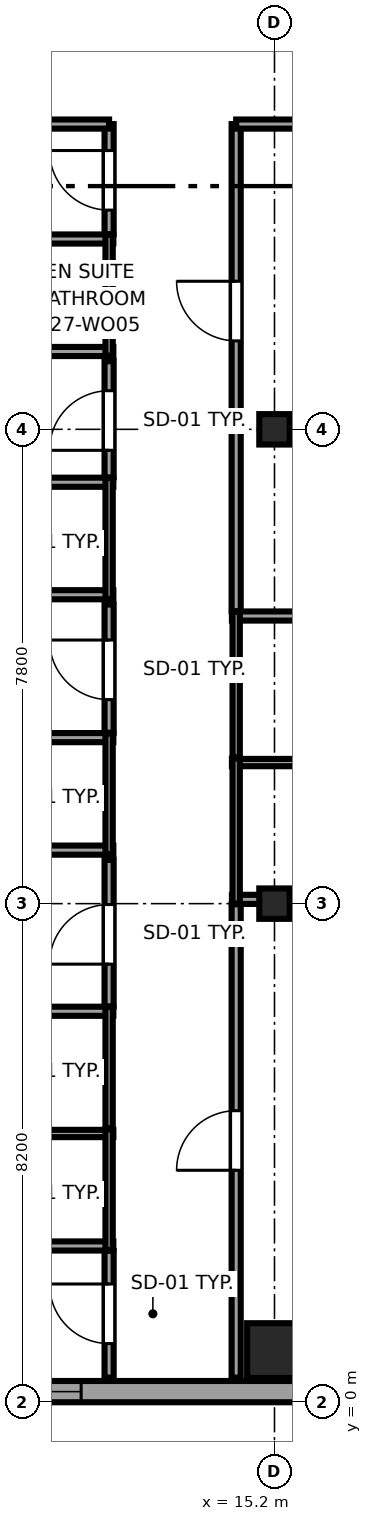
"""IFC4 building model, lengths in metres.
Left out: names, types, materials, properties, quantities, classifications, styles, units other than length and angle.
Written with IfcOpenShell. Run it as: python <this file> out.ifc"""

import sys

from ifc_helpers import new_model, si_unit, direction, frame, frame_2d, origin, origin_2d, place, context, subcontext, project, spatial, rectangle, i_section, extrude, source, transform, mapped, element, fill, save


model = new_model("IFC4")
c1 = context("Model", 3, precision=1e-05, world=origin(), true_north=direction((0.0, 1.0)))
c2 = subcontext(c1, "Body", "Model", "MODEL_VIEW")
j1 = project(units=[si_unit("LENGTHUNIT", "METRE"), si_unit("PLANEANGLEUNIT", "RADIAN")], contexts=[c1])
p1 = place(None, origin())
s1 = spatial("IfcSite", under=j1, at=p1, CompositionType="ELEMENT")
p2 = place(p1, origin())
s2 = spatial("IfcBuilding", under=s1, at=p2, CompositionType="ELEMENT")
p3 = place(p2, frame((0.0, 0.0, 108.0)))
s3 = spatial("IfcBuildingStorey", under=s2, at=p3, CompositionType="ELEMENT", Elevation=108.0)
m1 = source(origin(), c2, "Body", "SweptSolid", [
    extrude(rectangle(XDim=0.9, YDim=0.9, at=origin_2d()), origin(), (0.0, 0.0, 1.0), 3.55),
])
p4 = place(p3, frame((15.2, 0.85, 0.0), z_axis=(0.0, 0.0, 1.0), x_axis=(1.0, 0.0, 0.0)))
e1 = element("IfcColumn", 1, at=p4, inside=s3, PredefinedType="COLUMN", context=c2, shape_type="MappedRepresentation", body=[
    mapped(m1, transform((0.0, 0.0, 0.0), x_axis=(1.0, 0.0, 0.0), y_axis=(0.0, 1.0, 0.0), z_axis=(0.0, 0.0, 1.0), scale=1.0)),
])
m2 = source(origin(), c2, "Body", "SweptSolid", [
    extrude(i_section(OverallWidth=0.5, OverallDepth=0.5, WebThickness=0.022, FlangeThickness=0.034, at=origin_2d()), origin(), (0.0, 0.0, 1.0), 3.55),
])
for number, where, z_axis, x_axis in (
    (2, (15.2, 8.2, 0.0), (0.0, 0.0, 1.0), (1.0, 0.0, 0.0)),
    (3, (15.2, 16.0, 0.0), (0.0, 0.0, 1.0), (1.0, 0.0, 0.0)),
):
    element("IfcColumn", number, at=place(p3, frame(where, z_axis=z_axis, x_axis=x_axis)), inside=s3, PredefinedType="COLUMN", context=c2, shape_type="MappedRepresentation", body=[
        mapped(m2, transform((0.0, 0.0, 0.0), x_axis=(1.0, 0.0, 0.0), y_axis=(0.0, 1.0, 0.0), z_axis=(0.0, 0.0, 1.0), scale=1.0)),
    ])
p5 = place(p3, frame((4.617, 0.175, 0.0), z_axis=(0.0, 0.0, 1.0), x_axis=(1.0, 0.0, 0.0)))
e4 = element("IfcWall", 4, at=p5, inside=s3, PredefinedType="SOLIDWALL", context=c2, shape_type="SweptSolid", body=[
    extrude(rectangle(XDim=18.008, YDim=0.35, at=frame_2d((9.004, 0.0))), origin(), (0.0, 0.0, 1.0), 3.37),
])
p6 = place(p5, frame((5.303, 0.0, 0.68)))
e5 = element("IfcOpeningElement", 5, at=p6, cuts=e4, PredefinedType="OPENING", context=c2, shape_type="SweptSolid", body=[
    extrude(rectangle(XDim=2.1, YDim=1.9, at=frame_2d((1.05, 0.95))), frame((0.0, 0.185, 0.0), z_axis=(0.0, -1.0, 0.0), x_axis=(1.0, 0.0, 0.0)), (0.0, 0.0, 1.0), 0.37),
])
p7 = place(p5, frame((14.257, 0.0, 0.68)))
e6 = element("IfcOpeningElement", 6, at=p7, cuts=e4, PredefinedType="OPENING", context=c2, shape_type="SweptSolid", body=[
    extrude(rectangle(XDim=2.1, YDim=1.9, at=frame_2d((1.05, 0.95))), frame((0.0, 0.185, 0.0), z_axis=(0.0, -1.0, 0.0), x_axis=(1.0, 0.0, 0.0)), (0.0, 0.0, 1.0), 0.37),
])
p8 = place(p3, frame((9.96, 2.57, 0.0), z_axis=(0.0, 0.0, 1.0), x_axis=(1.0, 0.0, 0.0)))
e7 = element("IfcWall", 7, at=p8, inside=s3, PredefinedType="PARTITIONING", context=c2, shape_type="SweptSolid", body=[
    extrude(rectangle(XDim=2.59, YDim=0.15, at=frame_2d((1.295, 0.0))), origin(), (0.0, 0.0, 1.0), 3.37),
])
p9 = place(p3, frame((9.96, 4.42, 0.0), z_axis=(0.0, 0.0, 1.0), x_axis=(1.0, 0.0, 0.0)))
e8 = element("IfcWall", 8, at=p9, inside=s3, PredefinedType="PLUMBINGWALL", context=c2, shape_type="SweptSolid", body=[
    extrude(rectangle(XDim=2.59, YDim=0.12, at=frame_2d((1.295, 0.0))), origin(), (0.0, 0.0, 1.0), 3.37),
])
p10 = place(p3, frame((12.48, 2.5, 0.0), z_axis=(0.0, 0.0, 1.0), x_axis=(0.0, 1.0, 0.0)))
e9 = element("IfcWall", 9, at=p10, inside=s3, PredefinedType="PLUMBINGWALL", context=c2, shape_type="SweptSolid", body=[
    extrude(rectangle(XDim=1.99, YDim=0.12, at=frame_2d((0.995, 0.0))), origin(), (0.0, 0.0, 1.0), 3.37),
])
p11 = place(p3, frame((9.96, 6.43, 0.0), z_axis=(0.0, 0.0, 1.0), x_axis=(1.0, 0.0, 0.0)))
e10 = element("IfcWall", 10, at=p11, inside=s3, PredefinedType="PARTITIONING", context=c2, shape_type="SweptSolid", body=[
    extrude(rectangle(XDim=2.59, YDim=0.15, at=frame_2d((1.295, 0.0))), origin(), (0.0, 0.0, 1.0), 3.37),
])
p12 = place(p3, frame((12.48, 4.51, 0.0), z_axis=(0.0, 0.0, 1.0), x_axis=(0.0, 1.0, 0.0)))
e11 = element("IfcWall", 11, at=p12, inside=s3, PredefinedType="PLUMBINGWALL", context=c2, shape_type="SweptSolid", body=[
    extrude(rectangle(XDim=1.99, YDim=0.12, at=frame_2d((0.995, 0.0))), origin(), (0.0, 0.0, 1.0), 3.37),
])
p13 = place(p3, frame((0.405, 9.08, 0.0), z_axis=(0.0, 0.0, 1.0), x_axis=(1.0, 0.0, 0.0)))
e12 = element("IfcWall", 12, at=p13, inside=s3, PredefinedType="PARTITIONING", context=c2, shape_type="SweptSolid", body=[
    extrude(rectangle(XDim=12.145, YDim=0.15, at=frame_2d((6.073, 0.0))), origin(), (0.0, 0.0, 1.0), 3.37),
])
p14 = place(p3, frame((9.96, 10.93, 0.0), z_axis=(0.0, 0.0, 1.0), x_axis=(1.0, 0.0, 0.0)))
e13 = element("IfcWall", 13, at=p14, inside=s3, PredefinedType="PARTITIONING", context=c2, shape_type="SweptSolid", body=[
    extrude(rectangle(XDim=2.59, YDim=0.15, at=frame_2d((1.295, 0.0))), origin(), (0.0, 0.0, 1.0), 3.37),
])
p15 = place(p3, frame((12.48, 9.01, 0.0), z_axis=(0.0, 0.0, 1.0), x_axis=(0.0, 1.0, 0.0)))
e14 = element("IfcWall", 14, at=p15, inside=s3, PredefinedType="PLUMBINGWALL", context=c2, shape_type="SweptSolid", body=[
    extrude(rectangle(XDim=1.99, YDim=0.12, at=frame_2d((0.995, 0.0))), origin(), (0.0, 0.0, 1.0), 3.37),
])
p16 = place(p3, frame((0.405, 13.28, 0.0), z_axis=(0.0, 0.0, 1.0), x_axis=(1.0, 0.0, 0.0)))
e15 = element("IfcWall", 15, at=p16, inside=s3, PredefinedType="PARTITIONING", context=c2, shape_type="SweptSolid", body=[
    extrude(rectangle(XDim=12.145, YDim=0.15, at=frame_2d((6.073, 0.0))), origin(), (0.0, 0.0, 1.0), 3.37),
])
p17 = place(p3, frame((9.96, 15.13, 0.0), z_axis=(0.0, 0.0, 1.0), x_axis=(1.0, 0.0, 0.0)))
e16 = element("IfcWall", 16, at=p17, inside=s3, PredefinedType="PARTITIONING", context=c2, shape_type="SweptSolid", body=[
    extrude(rectangle(XDim=2.59, YDim=0.15, at=frame_2d((1.295, 0.0))), origin(), (0.0, 0.0, 1.0), 3.37),
])
p18 = place(p3, frame((12.48, 13.21, 0.0), z_axis=(0.0, 0.0, 1.0), x_axis=(0.0, 1.0, 0.0)))
e17 = element("IfcWall", 17, at=p18, inside=s3, PredefinedType="PLUMBINGWALL", context=c2, shape_type="SweptSolid", body=[
    extrude(rectangle(XDim=1.99, YDim=0.12, at=frame_2d((0.995, 0.0))), origin(), (0.0, 0.0, 1.0), 3.37),
])
p19 = place(p3, frame((0.405, 17.28, 0.0), z_axis=(0.0, 0.0, 1.0), x_axis=(1.0, 0.0, 0.0)))
e18 = element("IfcWall", 18, at=p19, inside=s3, PredefinedType="PARTITIONING", context=c2, shape_type="SweptSolid", body=[
    extrude(rectangle(XDim=12.145, YDim=0.15, at=frame_2d((6.073, 0.0))), origin(), (0.0, 0.0, 1.0), 3.37),
])
p20 = place(p3, frame((9.96, 19.13, 0.0), z_axis=(0.0, 0.0, 1.0), x_axis=(1.0, 0.0, 0.0)))
e19 = element("IfcWall", 19, at=p20, inside=s3, PredefinedType="PARTITIONING", context=c2, shape_type="SweptSolid", body=[
    extrude(rectangle(XDim=2.59, YDim=0.15, at=frame_2d((1.295, 0.0))), origin(), (0.0, 0.0, 1.0), 3.37),
])
p21 = place(p3, frame((12.48, 17.21, 0.0), z_axis=(0.0, 0.0, 1.0), x_axis=(0.0, 1.0, 0.0)))
e20 = element("IfcWall", 20, at=p21, inside=s3, PredefinedType="PLUMBINGWALL", context=c2, shape_type="SweptSolid", body=[
    extrude(rectangle(XDim=1.99, YDim=0.12, at=frame_2d((0.995, 0.0))), origin(), (0.0, 0.0, 1.0), 3.37),
])
p22 = place(p3, frame((14.5, 8.27, 0.0), z_axis=(0.0, 0.0, 1.0), x_axis=(1.0, 0.0, 0.0)))
e21 = element("IfcWall", 21, at=p22, inside=s3, PredefinedType="PARTITIONING", context=c2, shape_type="SweptSolid", body=[
    extrude(rectangle(XDim=2.59, YDim=0.15, at=frame_2d((1.295, 0.0))), origin(), (0.0, 0.0, 1.0), 2.748),
])
p23 = place(p3, frame((14.5, 10.52, 0.0), z_axis=(0.0, 0.0, 1.0), x_axis=(1.0, 0.0, 0.0)))
e22 = element("IfcWall", 22, at=p23, inside=s3, PredefinedType="PLUMBINGWALL", context=c2, shape_type="SweptSolid", body=[
    extrude(rectangle(XDim=2.59, YDim=0.12, at=frame_2d((1.295, 0.0))), origin(), (0.0, 0.0, 1.0), 3.37),
])
p24 = place(p3, frame((14.57, 8.2, 0.0), z_axis=(0.0, 0.0, 1.0), x_axis=(0.0, 1.0, 0.0)))
e23 = element("IfcWall", 23, at=p24, inside=s3, PredefinedType="PLUMBINGWALL", context=c2, shape_type="SweptSolid", body=[
    extrude(rectangle(XDim=2.39, YDim=0.12, at=frame_2d((1.195, 0.0))), origin(), (0.0, 0.0, 1.0), 3.37),
])
p25 = place(p3, frame((14.5, 12.93, 0.0), z_axis=(0.0, 0.0, 1.0), x_axis=(1.0, 0.0, 0.0)))
e24 = element("IfcWall", 24, at=p25, inside=s3, PredefinedType="PARTITIONING", context=c2, shape_type="SweptSolid", body=[
    extrude(rectangle(XDim=2.59, YDim=0.15, at=frame_2d((1.295, 0.0))), origin(), (0.0, 0.0, 1.0), 3.37),
])
p26 = place(p3, frame((14.57, 10.61, 0.0), z_axis=(0.0, 0.0, 1.0), x_axis=(0.0, 1.0, 0.0)))
e25 = element("IfcWall", 25, at=p26, inside=s3, PredefinedType="PLUMBINGWALL", context=c2, shape_type="SweptSolid", body=[
    extrude(rectangle(XDim=2.39, YDim=0.12, at=frame_2d((1.195, 0.0))), origin(), (0.0, 0.0, 1.0), 3.37),
])
p27 = place(p3, frame((12.48, 0.405, 0.0), z_axis=(0.0, 0.0, 1.0), x_axis=(0.0, 1.0, 0.0)))
e26 = element("IfcWall", 26, at=p27, inside=s3, PredefinedType="PARTITIONING", context=c2, shape_type="SweptSolid", body=[
    extrude(rectangle(XDim=2.085, YDim=0.15, at=frame_2d((1.042, 0.0))), origin(), (0.0, 0.0, 1.0), 3.37),
])
p28 = place(p27, frame((0.56, 0.0, 0.0)))
e27 = element("IfcOpeningElement", 27, at=p28, cuts=e26, PredefinedType="OPENING", context=c2, shape_type="SweptSolid", body=[
    extrude(rectangle(XDim=0.98, YDim=2.12, at=frame_2d((0.49, 1.06))), frame((0.0, 0.085, 0.0), z_axis=(0.0, -1.0, 0.0), x_axis=(1.0, 0.0, 0.0)), (0.0, 0.0, 1.0), 0.17),
])
p29 = place(p3, frame((12.48, 6.51, 0.0), z_axis=(0.0, 0.0, 1.0), x_axis=(0.0, 1.0, 0.0)))
e28 = element("IfcWall", 28, at=p29, inside=s3, PredefinedType="PARTITIONING", context=c2, shape_type="SweptSolid", body=[
    extrude(rectangle(XDim=2.41, YDim=0.15, at=frame_2d((1.205, 0.0))), origin(), (0.0, 0.0, 1.0), 3.37),
])
p30 = place(p29, frame((0.695, 0.0, 0.0)))
e29 = element("IfcOpeningElement", 29, at=p30, cuts=e28, PredefinedType="OPENING", context=c2, shape_type="SweptSolid", body=[
    extrude(rectangle(XDim=0.98, YDim=2.12, at=frame_2d((0.49, 1.06))), frame((0.0, 0.085, 0.0), z_axis=(0.0, -1.0, 0.0), x_axis=(1.0, 0.0, 0.0)), (0.0, 0.0, 1.0), 0.17),
])
p31 = place(p3, frame((12.48, 11.01, 0.0), z_axis=(0.0, 0.0, 1.0), x_axis=(0.0, 1.0, 0.0)))
e30 = element("IfcWall", 30, at=p31, inside=s3, PredefinedType="PARTITIONING", context=c2, shape_type="SweptSolid", body=[
    extrude(rectangle(XDim=2.11, YDim=0.15, at=frame_2d((1.055, 0.0))), origin(), (0.0, 0.0, 1.0), 3.37),
])
p32 = place(p31, frame((0.545, 0.0, 0.0)))
e31 = element("IfcOpeningElement", 31, at=p32, cuts=e30, PredefinedType="OPENING", context=c2, shape_type="SweptSolid", body=[
    extrude(rectangle(XDim=0.98, YDim=2.12, at=frame_2d((0.49, 1.06))), frame((0.0, 0.085, 0.0), z_axis=(0.0, -1.0, 0.0), x_axis=(1.0, 0.0, 0.0)), (0.0, 0.0, 1.0), 0.17),
])
p33 = place(p3, frame((12.48, 15.21, 0.0), z_axis=(0.0, 0.0, 1.0), x_axis=(0.0, 1.0, 0.0)))
e32 = element("IfcWall", 32, at=p33, inside=s3, PredefinedType="PARTITIONING", context=c2, shape_type="SweptSolid", body=[
    extrude(rectangle(XDim=1.91, YDim=0.15, at=frame_2d((0.955, 0.0))), origin(), (0.0, 0.0, 1.0), 3.37),
])
p34 = place(p33, frame((0.445, 0.0, 0.0)))
e33 = element("IfcOpeningElement", 33, at=p34, cuts=e32, PredefinedType="OPENING", context=c2, shape_type="SweptSolid", body=[
    extrude(rectangle(XDim=0.98, YDim=2.12, at=frame_2d((0.49, 1.06))), frame((0.0, 0.085, 0.0), z_axis=(0.0, -1.0, 0.0), x_axis=(1.0, 0.0, 0.0)), (0.0, 0.0, 1.0), 0.17),
])
p35 = place(p3, frame((12.48, 19.21, 0.0), z_axis=(0.0, 0.0, 1.0), x_axis=(0.0, 1.0, 0.0)))
e34 = element("IfcWall", 34, at=p35, inside=s3, PredefinedType="PARTITIONING", context=c2, shape_type="SweptSolid", body=[
    extrude(rectangle(XDim=1.81, YDim=0.15, at=frame_2d((0.905, 0.0))), origin(), (0.0, 0.0, 1.0), 3.37),
])
p36 = place(p35, frame((0.395, 0.0, 0.0)))
e35 = element("IfcOpeningElement", 35, at=p36, cuts=e34, PredefinedType="OPENING", context=c2, shape_type="SweptSolid", body=[
    extrude(rectangle(XDim=0.98, YDim=2.12, at=frame_2d((0.49, 1.06))), frame((0.0, 0.085, 0.0), z_axis=(0.0, -1.0, 0.0), x_axis=(1.0, 0.0, 0.0)), (0.0, 0.0, 1.0), 0.17),
])
p37 = place(p3, frame((0.405, 21.02, 0.0), z_axis=(0.0, 0.0, 1.0), x_axis=(1.0, 0.0, 0.0)))
e36 = element("IfcWall", 36, at=p37, inside=s3, PredefinedType="PARTITIONING", context=c2, shape_type="SweptSolid", body=[
    extrude(rectangle(XDim=12.075, YDim=0.15, at=frame_2d((6.038, 0.0))), origin(), (0.0, 0.0, 1.0), 3.37),
])
p38 = place(p3, frame((14.57, 0.405, 0.0), z_axis=(0.0, 0.0, 1.0), x_axis=(0.0, 1.0, 0.0)))
e37 = element("IfcWall", 37, at=p38, inside=s3, PredefinedType="PARTITIONING", context=c2, shape_type="SweptSolid", body=[
    extrude(rectangle(XDim=7.785, YDim=0.15, at=frame_2d((3.893, 0.0))), origin(), (0.0, 0.0, 1.0), 3.37),
])
p39 = place(p38, frame((3.41, 0.0, 0.0)))
e38 = element("IfcOpeningElement", 38, at=p39, cuts=e37, PredefinedType="OPENING", context=c2, shape_type="SweptSolid", body=[
    extrude(rectangle(XDim=0.98, YDim=2.12, at=frame_2d((0.49, 1.06))), frame((0.0, 0.085, 0.0), z_axis=(0.0, -1.0, 0.0), x_axis=(1.0, 0.0, 0.0)), (0.0, 0.0, 1.0), 0.17),
])
p40 = place(p3, frame((14.57, 13.01, 0.0), z_axis=(0.0, 0.0, 1.0), x_axis=(0.0, 1.0, 0.0)))
e39 = element("IfcWall", 39, at=p40, inside=s3, PredefinedType="PARTITIONING", context=c2, shape_type="SweptSolid", body=[
    extrude(rectangle(XDim=8.01, YDim=0.15, at=frame_2d((4.005, 0.0))), origin(), (0.0, 0.0, 1.0), 3.37),
])
p41 = place(p40, frame((4.445, 0.0, 0.0)))
e40 = element("IfcOpeningElement", 40, at=p41, cuts=e39, PredefinedType="OPENING", context=c2, shape_type="SweptSolid", body=[
    extrude(rectangle(XDim=0.98, YDim=2.12, at=frame_2d((0.49, 1.06))), frame((0.0, 0.085, 0.0), z_axis=(0.0, -1.0, 0.0), x_axis=(1.0, 0.0, 0.0)), (0.0, 0.0, 1.0), 0.17),
])
p42 = place(p3, frame((14.57, 21.02, 0.0), z_axis=(0.0, 0.0, 1.0), x_axis=(1.0, 0.0, 0.0)))
e41 = element("IfcWall", 41, at=p42, inside=s3, PredefinedType="PARTITIONING", context=c2, shape_type="SweptSolid", body=[
    extrude(rectangle(XDim=7.78, YDim=0.15, at=frame_2d((3.89, 0.0))), origin(), (0.0, 0.0, 1.0), 3.37),
])
m3 = source(origin(), c2, "Body", "SweptSolid", [
    extrude(rectangle(XDim=2.1, YDim=1.9, at=frame_2d((1.05, 0.95))), frame((0.0, 0.09, 0.0), z_axis=(0.0, -1.0, 0.0), x_axis=(1.0, 0.0, 0.0)), (0.0, 0.0, 1.0), 0.06),
])
p43 = place(p6, origin())
e42 = element("IfcWindow", 42, at=p43, inside=s3, PartitioningType="TRIPLE_PANEL_HORIZONTAL", PredefinedType="WINDOW", context=c2, shape_type="MappedRepresentation", body=[
    mapped(m3, transform((0.0, 0.0, 0.0), x_axis=(1.0, 0.0, 0.0), y_axis=(0.0, 1.0, 0.0), z_axis=(0.0, 0.0, 1.0), scale=1.0)),
])
fill(e5, e42)
m4 = source(origin(), c2, "Body", "SweptSolid", [
    extrude(rectangle(XDim=0.98, YDim=2.12, at=frame_2d((0.49, 1.06))), frame((0.0, 0.025, 0.0), z_axis=(0.0, -1.0, 0.0), x_axis=(1.0, 0.0, 0.0)), (0.0, 0.0, 1.0), 0.05),
])
p44 = place(p28, origin())
e43 = element("IfcDoor", 43, at=p44, inside=s3, OperationType="SINGLE_SWING_RIGHT", PredefinedType="DOOR", context=c2, shape_type="MappedRepresentation", body=[
    mapped(m4, transform((0.0, 0.0, 0.0), x_axis=(1.0, 0.0, 0.0), y_axis=(0.0, 1.0, 0.0), z_axis=(0.0, 0.0, 1.0), scale=1.0)),
])
fill(e27, e43)
p45 = place(p30, origin())
e44 = element("IfcDoor", 44, at=p45, inside=s3, OperationType="SINGLE_SWING_LEFT", PredefinedType="DOOR", context=c2, shape_type="MappedRepresentation", body=[
    mapped(m4, transform((0.0, 0.0, 0.0), x_axis=(1.0, 0.0, 0.0), y_axis=(0.0, 1.0, 0.0), z_axis=(0.0, 0.0, 1.0), scale=1.0)),
])
fill(e29, e44)
p46 = place(p32, origin())
e45 = element("IfcDoor", 45, at=p46, inside=s3, OperationType="SINGLE_SWING_RIGHT", PredefinedType="DOOR", context=c2, shape_type="MappedRepresentation", body=[
    mapped(m4, transform((0.0, 0.0, 0.0), x_axis=(1.0, 0.0, 0.0), y_axis=(0.0, 1.0, 0.0), z_axis=(0.0, 0.0, 1.0), scale=1.0)),
])
fill(e31, e45)
p47 = place(p34, origin())
e46 = element("IfcDoor", 46, at=p47, inside=s3, OperationType="SINGLE_SWING_LEFT", PredefinedType="DOOR", context=c2, shape_type="MappedRepresentation", body=[
    mapped(m4, transform((0.0, 0.0, 0.0), x_axis=(1.0, 0.0, 0.0), y_axis=(0.0, 1.0, 0.0), z_axis=(0.0, 0.0, 1.0), scale=1.0)),
])
fill(e33, e46)
p48 = place(p36, origin())
e47 = element("IfcDoor", 47, at=p48, inside=s3, OperationType="SINGLE_SWING_RIGHT", PredefinedType="DOOR", context=c2, shape_type="MappedRepresentation", body=[
    mapped(m4, transform((0.0, 0.0, 0.0), x_axis=(1.0, 0.0, 0.0), y_axis=(0.0, 1.0, 0.0), z_axis=(0.0, 0.0, 1.0), scale=1.0)),
])
fill(e35, e47)
p49 = place(p39, origin())
e48 = element("IfcDoor", 48, at=p49, inside=s3, OperationType="SINGLE_SWING_LEFT", PredefinedType="DOOR", context=c2, shape_type="MappedRepresentation", body=[
    mapped(m4, transform((0.0, 0.0, 0.0), x_axis=(1.0, 0.0, 0.0), y_axis=(0.0, 1.0, 0.0), z_axis=(0.0, 0.0, 1.0), scale=1.0)),
])
fill(e38, e48)
p50 = place(p41, origin())
e49 = element("IfcDoor", 49, at=p50, inside=s3, OperationType="SINGLE_SWING_RIGHT", PredefinedType="DOOR", context=c2, shape_type="MappedRepresentation", body=[
    mapped(m4, transform((0.0, 0.0, 0.0), x_axis=(1.0, 0.0, 0.0), y_axis=(0.0, 1.0, 0.0), z_axis=(0.0, 0.0, 1.0), scale=1.0)),
])
fill(e40, e49)
save(model, sys.argv[1])
